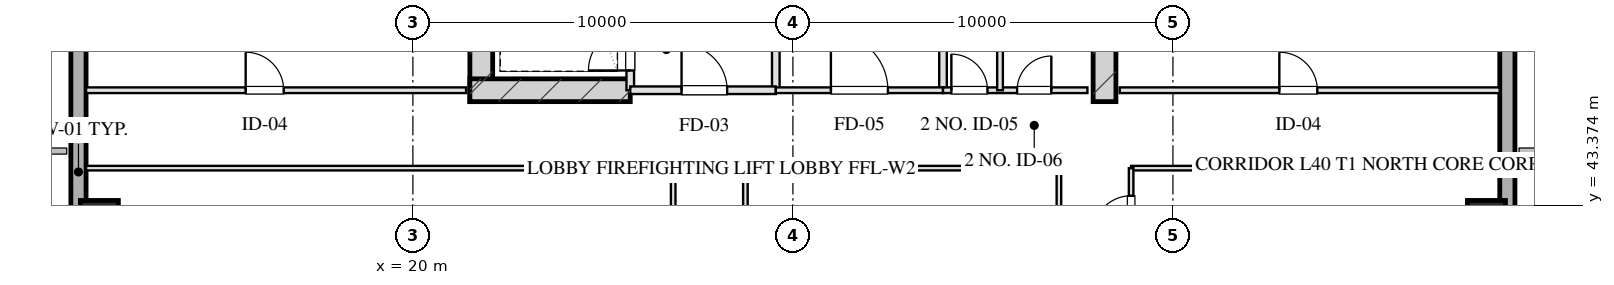
"""IFC4 building model, lengths in metres.
Left out: names, types, materials, properties, quantities, classifications, styles, units other than length and angle.
Written with IfcOpenShell. Run it as: python <this file> out.ifc"""

import sys

from ifc_helpers import new_model, si_unit, direction, frame, frame_2d, origin, origin_2d, place, context, subcontext, project, spatial, rectangle, hollow_rectangle, extrude, element, fill, save


model = new_model("IFC4")
c1 = context("Model", 3, precision=1e-05, world=origin(), true_north=direction((0.0, 1.0)))
c2 = subcontext(c1, "Body", "Model", "MODEL_VIEW")
j1 = project(units=[si_unit("LENGTHUNIT", "METRE"), si_unit("PLANEANGLEUNIT", "RADIAN")], contexts=[c1])
p1 = place(None, origin())
s1 = spatial("IfcSite", under=j1, at=p1, CompositionType="ELEMENT")
p2 = place(p1, origin())
s2 = spatial("IfcBuilding", under=s1, at=p2, CompositionType="ELEMENT")
p3 = place(p2, frame((0.0, 0.0, 152.95)))
s3 = spatial("IfcBuildingStorey", under=s2, at=p3, CompositionType="ELEMENT", Elevation=152.95)
for number, where, z_axis, x_axis in (
    (1, (21.8, 46.1, 0.0), (0.0, 0.0, 1.0), (0.0, 1.0, 0.0)),
    (2, (38.2, 46.1, 0.0), (0.0, 0.0, 1.0), (0.0, 1.0, 0.0)),
):
    element("IfcWall", number, at=place(p3, frame(where, z_axis=z_axis, x_axis=x_axis)), inside=s3, PredefinedType="SHEAR", context=c2, shape_type="SweptSolid", body=[
        extrude(rectangle(XDim=9.48, YDim=0.6, at=frame_2d((4.74, 0.0))), origin(), (0.0, 0.0, 1.0), 3.45),
    ])
p4 = place(p3, frame((21.5, 46.4, 0.0), z_axis=(0.0, 0.0, 1.0), x_axis=(1.0, 0.0, 0.0)))
e3 = element("IfcWall", 3, at=p4, inside=s3, PredefinedType="SHEAR", context=c2, shape_type="SweptSolid", body=[
    extrude(rectangle(XDim=4.22, YDim=0.6, at=frame_2d((2.11, 0.0))), origin(), (0.0, 0.0, 1.0), 3.45),
])
for number, where, z_axis, x_axis in (
    (4, (11.75, 43.0, 0.0), (0.0, 0.0, 1.0), (1.0, 0.0, 0.0)),
    (5, (48.25, 43.0, 0.0), (0.0, 0.0, 1.0), (1.0, 0.0, 0.0)),
):
    element("IfcColumn", number, at=place(p3, frame(where, z_axis=z_axis, x_axis=x_axis)), inside=s3, PredefinedType="COLUMN", context=c2, shape_type="SweptSolid", body=[
        extrude(hollow_rectangle(XDim=1.0, YDim=1.0, WallThickness=0.036, at=origin_2d()), origin(), (0.0, 0.0, 1.0), 3.451),
    ])
p5 = place(p3, frame((11.2, 9.0, 0.0), z_axis=(0.0, 0.0, 1.0), x_axis=(0.0, 1.0, 0.0)))
e6 = element("IfcWall", 6, at=p5, inside=s3, PredefinedType="SOLIDWALL", context=c2, shape_type="SweptSolid", body=[
    extrude(rectangle(XDim=50.0, YDim=0.4, at=frame_2d((25.0, 0.0))), origin(), (0.0, 0.0, 1.0), 2.61),
])
p6 = place(p5, frame((30.275, 0.0, 0.75)))
e7 = element("IfcOpeningElement", 7, at=p6, cuts=e6, PredefinedType="OPENING", context=c2, shape_type="SweptSolid", body=[
    extrude(rectangle(XDim=2.25, YDim=1.46, at=frame_2d((1.125, 0.73))), frame((0.0, 0.21, 0.0), z_axis=(0.0, -1.0, 0.0), x_axis=(1.0, 0.0, 0.0)), (0.0, 0.0, 1.0), 0.42),
])
p7 = place(p5, frame((18.65, 0.0, 0.0)))
e8 = element("IfcOpeningElement", 8, at=p7, cuts=e6, PredefinedType="OPENING", context=c2, shape_type="SweptSolid", body=[
    extrude(rectangle(XDim=1.1, YDim=2.15, at=frame_2d((0.55, 1.075))), frame((0.0, 0.21, 0.0), z_axis=(0.0, -1.0, 0.0), x_axis=(1.0, 0.0, 0.0)), (0.0, 0.0, 1.0), 0.42),
])
p8 = place(p3, frame((48.8, 59.0, 0.0), z_axis=(0.0, 0.0, 1.0), x_axis=(0.0, -1.0, 0.0)))
e9 = element("IfcWall", 9, at=p8, inside=s3, PredefinedType="SOLIDWALL", context=c2, shape_type="SweptSolid", body=[
    extrude(rectangle(XDim=50.0, YDim=0.4, at=frame_2d((25.0, 0.0))), origin(), (0.0, 0.0, 1.0), 2.61),
])
p9 = place(p8, frame((30.25, 0.0, 0.0)))
e10 = element("IfcOpeningElement", 10, at=p9, cuts=e9, PredefinedType="OPENING", context=c2, shape_type="SweptSolid", body=[
    extrude(rectangle(XDim=1.1, YDim=2.15, at=frame_2d((0.55, 1.075))), frame((0.0, 0.21, 0.0), z_axis=(0.0, -1.0, 0.0), x_axis=(1.0, 0.0, 0.0)), (0.0, 0.0, 1.0), 0.42),
])
p10 = place(p3, frame((25.72, 46.4, 0.0), z_axis=(0.0, 0.0, 1.0), x_axis=(0.0, 1.0, 0.0)))
e11 = element("IfcWall", 11, at=p10, inside=s3, PredefinedType="PARTITIONING", context=c2, shape_type="SweptSolid", body=[
    extrude(rectangle(XDim=1.9, YDim=0.2, at=frame_2d((0.95, 0.0))), origin(), (0.0, 0.0, 1.0), 3.175),
])
p11 = place(p10, frame((0.52, 0.0, 0.0)))
e12 = element("IfcOpeningElement", 12, at=p11, cuts=e11, PredefinedType="OPENING", context=c2, shape_type="SweptSolid", body=[
    extrude(rectangle(XDim=1.1, YDim=2.05, at=frame_2d((0.55, 1.025))), frame((0.0, 0.11, 0.0), z_axis=(0.0, -1.0, 0.0), x_axis=(1.0, 0.0, 0.0)), (0.0, 0.0, 1.0), 0.22),
])
p12 = place(p3, frame((29.55, 46.4, 0.0), z_axis=(0.0, 0.0, 1.0), x_axis=(0.0, 1.0, 0.0)))
e13 = element("IfcWall", 13, at=p12, inside=s3, PredefinedType="PARTITIONING", context=c2, shape_type="SweptSolid", body=[
    extrude(rectangle(XDim=8.43, YDim=0.2, at=frame_2d((4.215, 0.0))), origin(), (0.0, 0.0, 1.0), 3.175),
])
p13 = place(p3, frame((25.72, 46.4, 0.0), z_axis=(0.0, 0.0, 1.0), x_axis=(1.0, 0.0, 0.0)))
e14 = element("IfcWall", 14, at=p13, inside=s3, PredefinedType="PARTITIONING", context=c2, shape_type="SweptSolid", body=[
    extrude(rectangle(XDim=3.83, YDim=0.2, at=frame_2d((1.915, 0.0))), origin(), (0.0, 0.0, 1.0), 3.175),
])
p14 = place(p13, frame((1.35, 0.0, 0.0)))
e15 = element("IfcOpeningElement", 15, at=p14, cuts=e14, PredefinedType="OPENING", context=c2, shape_type="SweptSolid", body=[
    extrude(rectangle(XDim=1.2, YDim=2.05, at=frame_2d((0.6, 1.025))), frame((0.0, 0.11, 0.0), z_axis=(0.0, -1.0, 0.0), x_axis=(1.0, 0.0, 0.0)), (0.0, 0.0, 1.0), 0.22),
])
p15 = place(p3, frame((33.95, 46.4, 0.0), z_axis=(0.0, 0.0, 1.0), x_axis=(0.0, 1.0, 0.0)))
e16 = element("IfcWall", 16, at=p15, inside=s3, PredefinedType="PARTITIONING", context=c2, shape_type="SweptSolid", body=[
    extrude(rectangle(XDim=8.43, YDim=0.2, at=frame_2d((4.215, 0.0))), origin(), (0.0, 0.0, 1.0), 3.175),
])
p16 = place(p3, frame((29.55, 46.4, 0.0), z_axis=(0.0, 0.0, 1.0), x_axis=(1.0, 0.0, 0.0)))
e17 = element("IfcWall", 17, at=p16, inside=s3, PredefinedType="PARTITIONING", context=c2, shape_type="SweptSolid", body=[
    extrude(rectangle(XDim=4.4, YDim=0.15, at=frame_2d((2.2, 0.0))), origin(), (0.0, 0.0, 1.0), 3.175),
])
p17 = place(p16, frame((1.45, 0.0, 0.0)))
e18 = element("IfcOpeningElement", 18, at=p17, cuts=e17, PredefinedType="OPENING", context=c2, shape_type="SweptSolid", body=[
    extrude(rectangle(XDim=1.5, YDim=2.05, at=frame_2d((0.75, 1.025))), frame((0.0, 0.085, 0.0), z_axis=(0.0, -1.0, 0.0), x_axis=(1.0, 0.0, 0.0)), (0.0, 0.0, 1.0), 0.17),
])
p18 = place(p3, frame((33.95, 46.4, 0.0), z_axis=(0.0, 0.0, 1.0), x_axis=(1.0, 0.0, 0.0)))
e19 = element("IfcWall", 19, at=p18, inside=s3, PredefinedType="PARTITIONING", context=c2, shape_type="SweptSolid", body=[
    extrude(rectangle(XDim=3.8, YDim=0.15, at=frame_2d((1.9, 0.0))), origin(), (0.0, 0.0, 1.0), 3.175),
])
p19 = place(p18, frame((0.22, 0.0, 0.0)))
e20 = element("IfcOpeningElement", 20, at=p19, cuts=e19, PredefinedType="OPENING", context=c2, shape_type="SweptSolid", body=[
    extrude(rectangle(XDim=0.95, YDim=2.05, at=frame_2d((0.475, 1.025))), frame((0.0, 0.085, 0.0), z_axis=(0.0, -1.0, 0.0), x_axis=(1.0, 0.0, 0.0)), (0.0, 0.0, 1.0), 0.17),
])
p20 = place(p18, frame((1.95, 0.0, 0.0)))
e21 = element("IfcOpeningElement", 21, at=p20, cuts=e19, PredefinedType="OPENING", context=c2, shape_type="SweptSolid", body=[
    extrude(rectangle(XDim=0.9, YDim=2.05, at=frame_2d((0.45, 1.025))), frame((0.0, 0.085, 0.0), z_axis=(0.0, -1.0, 0.0), x_axis=(1.0, 0.0, 0.0)), (0.0, 0.0, 1.0), 0.17),
])
p21 = place(p3, frame((35.45, 46.4, 0.0), z_axis=(0.0, 0.0, 1.0), x_axis=(0.0, 1.0, 0.0)))
e22 = element("IfcWall", 22, at=p21, inside=s3, PredefinedType="PARTITIONING", context=c2, shape_type="SweptSolid", body=[
    extrude(rectangle(XDim=8.43, YDim=0.15, at=frame_2d((4.215, 0.0))), origin(), (0.0, 0.0, 1.0), 2.765),
])
p22 = place(p21, frame((2.55, 0.0, 0.0)))
e23 = element("IfcOpeningElement", 23, at=p22, cuts=e22, PredefinedType="OPENING", context=c2, shape_type="SweptSolid", body=[
    extrude(rectangle(XDim=0.95, YDim=2.05, at=frame_2d((0.475, 1.025))), frame((0.0, 0.085, 0.0), z_axis=(0.0, -1.0, 0.0), x_axis=(1.0, 0.0, 0.0)), (0.0, 0.0, 1.0), 0.17),
])
p23 = place(p21, frame((5.6, 0.0, 0.0)))
e24 = element("IfcOpeningElement", 24, at=p23, cuts=e22, PredefinedType="OPENING", context=c2, shape_type="SweptSolid", body=[
    extrude(rectangle(XDim=0.9, YDim=2.05, at=frame_2d((0.45, 1.025))), frame((0.0, 0.085, 0.0), z_axis=(0.0, -1.0, 0.0), x_axis=(1.0, 0.0, 0.0)), (0.0, 0.0, 1.0), 0.17),
])
p24 = place(p3, frame((11.4, 46.4, 0.0), z_axis=(0.0, 0.0, 1.0), x_axis=(1.0, 0.0, 0.0)))
e25 = element("IfcWall", 25, at=p24, inside=s3, PredefinedType="PARTITIONING", context=c2, shape_type="SweptSolid", body=[
    extrude(rectangle(XDim=10.0, YDim=0.15, at=frame_2d((5.0, 0.0))), origin(), (0.0, 0.0, 1.0), 3.175),
])
p25 = place(p24, frame((4.2, 0.0, 0.0)))
e26 = element("IfcOpeningElement", 26, at=p25, cuts=e25, PredefinedType="OPENING", context=c2, shape_type="SweptSolid", body=[
    extrude(rectangle(XDim=1.0, YDim=2.05, at=frame_2d((0.5, 1.025))), frame((0.0, 0.085, 0.0), z_axis=(0.0, -1.0, 0.0), x_axis=(1.0, 0.0, 0.0)), (0.0, 0.0, 1.0), 0.17),
])
p26 = place(p3, frame((38.6, 46.4, 0.0), z_axis=(0.0, 0.0, 1.0), x_axis=(1.0, 0.0, 0.0)))
e27 = element("IfcWall", 27, at=p26, inside=s3, PredefinedType="PARTITIONING", context=c2, shape_type="SweptSolid", body=[
    extrude(rectangle(XDim=10.0, YDim=0.15, at=frame_2d((5.0, 0.0))), origin(), (0.0, 0.0, 1.0), 3.175),
])
p27 = place(p26, frame((4.2, 0.0, 0.0)))
e28 = element("IfcOpeningElement", 28, at=p27, cuts=e27, PredefinedType="OPENING", context=c2, shape_type="SweptSolid", body=[
    extrude(rectangle(XDim=1.0, YDim=2.05, at=frame_2d((0.5, 1.025))), frame((0.0, 0.085, 0.0), z_axis=(0.0, -1.0, 0.0), x_axis=(1.0, 0.0, 0.0)), (0.0, 0.0, 1.0), 0.17),
])
p28 = place(p3, frame((11.4, 44.35, 0.0), z_axis=(0.0, 0.0, 1.0), x_axis=(1.0, 0.0, 0.0)))
e29 = element("IfcWall", 29, at=p28, inside=s3, PredefinedType="PARTITIONING", context=c2, shape_type="SweptSolid", body=[
    extrude(rectangle(XDim=15.45, YDim=0.12, at=frame_2d((7.725, 0.0))), origin(), (0.0, 0.0, 1.0), 3.175),
])
p29 = place(p3, frame((28.75, 44.35, 0.0), z_axis=(0.0, 0.0, 1.0), x_axis=(1.0, 0.0, 0.0)))
e30 = element("IfcWall", 30, at=p29, inside=s3, PredefinedType="PARTITIONING", context=c2, shape_type="SweptSolid", body=[
    extrude(rectangle(XDim=8.25, YDim=0.12, at=frame_2d((4.125, 0.0))), origin(), (0.0, 0.0, 1.0), 3.175),
])
p30 = place(p3, frame((38.9, 44.35, 0.0), z_axis=(0.0, 0.0, 1.0), x_axis=(1.0, 0.0, 0.0)))
e31 = element("IfcWall", 31, at=p30, inside=s3, PredefinedType="PARTITIONING", context=c2, shape_type="SweptSolid", body=[
    extrude(rectangle(XDim=9.7, YDim=0.12, at=frame_2d((4.85, 0.0))), origin(), (0.0, 0.0, 1.0), 3.175),
])
p31 = place(p3, frame((26.85, 23.65, 0.0), z_axis=(0.0, 0.0, 1.0), x_axis=(0.0, 1.0, 0.0)))
e32 = element("IfcWall", 32, at=p31, inside=s3, PredefinedType="PARTITIONING", context=c2, shape_type="SweptSolid", body=[
    extrude(rectangle(XDim=20.7, YDim=0.12, at=frame_2d((10.35, 0.0))), origin(), (0.0, 0.0, 1.0), 3.175),
])
p32 = place(p31, frame((2.675, 0.0, 0.0)))
e33 = element("IfcOpeningElement", 33, at=p32, cuts=e32, PredefinedType="OPENING", context=c2, shape_type="SweptSolid", body=[
    extrude(rectangle(XDim=1.0, YDim=2.05, at=frame_2d((0.5, 1.025))), frame((0.0, 0.07, 0.0), z_axis=(0.0, -1.0, 0.0), x_axis=(1.0, 0.0, 0.0)), (0.0, 0.0, 1.0), 0.14),
])
p33 = place(p31, frame((9.85, 0.0, 0.0)))
e34 = element("IfcOpeningElement", 34, at=p33, cuts=e32, PredefinedType="OPENING", context=c2, shape_type="SweptSolid", body=[
    extrude(rectangle(XDim=1.05, YDim=2.05, at=frame_2d((0.525, 1.025))), frame((0.0, 0.07, 0.0), z_axis=(0.0, -1.0, 0.0), x_axis=(1.0, 0.0, 0.0)), (0.0, 0.0, 1.0), 0.14),
])
p34 = place(p31, frame((17.025, 0.0, 0.0)))
e35 = element("IfcOpeningElement", 35, at=p34, cuts=e32, PredefinedType="OPENING", context=c2, shape_type="SweptSolid", body=[
    extrude(rectangle(XDim=1.0, YDim=2.05, at=frame_2d((0.5, 1.025))), frame((0.0, 0.07, 0.0), z_axis=(0.0, -1.0, 0.0), x_axis=(1.0, 0.0, 0.0)), (0.0, 0.0, 1.0), 0.14),
])
p35 = place(p3, frame((28.75, 23.65, 0.0), z_axis=(0.0, 0.0, 1.0), x_axis=(0.0, 1.0, 0.0)))
e36 = element("IfcWall", 36, at=p35, inside=s3, PredefinedType="PARTITIONING", context=c2, shape_type="SweptSolid", body=[
    extrude(rectangle(XDim=20.7, YDim=0.12, at=frame_2d((10.35, 0.0))), origin(), (0.0, 0.0, 1.0), 3.175),
])
p36 = place(p35, frame((9.936, 0.0, 0.0)))
e37 = element("IfcOpeningElement", 37, at=p36, cuts=e36, PredefinedType="OPENING", context=c2, shape_type="SweptSolid", body=[
    extrude(rectangle(XDim=1.1, YDim=2.05, at=frame_2d((0.55, 1.025))), frame((0.0, 0.07, 0.0), z_axis=(0.0, -1.0, 0.0), x_axis=(1.0, 0.0, 0.0)), (0.0, 0.0, 1.0), 0.14),
])
p37 = place(p3, frame((37.0, 23.65, 0.0), z_axis=(0.0, 0.0, 1.0), x_axis=(0.0, 1.0, 0.0)))
e38 = element("IfcWall", 38, at=p37, inside=s3, PredefinedType="PARTITIONING", context=c2, shape_type="SweptSolid", body=[
    extrude(rectangle(XDim=20.7, YDim=0.12, at=frame_2d((10.35, 0.0))), origin(), (0.0, 0.0, 1.0), 3.175),
])
p38 = place(p3, frame((38.9, 23.65, 0.0), z_axis=(0.0, 0.0, 1.0), x_axis=(0.0, 1.0, 0.0)))
e39 = element("IfcWall", 39, at=p38, inside=s3, PredefinedType="PARTITIONING", context=c2, shape_type="SweptSolid", body=[
    extrude(rectangle(XDim=20.7, YDim=0.12, at=frame_2d((10.35, 0.0))), origin(), (0.0, 0.0, 1.0), 3.175),
])
p39 = place(p38, frame((0.775, 0.0, 0.0)))
e40 = element("IfcOpeningElement", 40, at=p39, cuts=e39, PredefinedType="OPENING", context=c2, shape_type="SweptSolid", body=[
    extrude(rectangle(XDim=1.0, YDim=2.05, at=frame_2d((0.5, 1.025))), frame((0.0, 0.07, 0.0), z_axis=(0.0, -1.0, 0.0), x_axis=(1.0, 0.0, 0.0)), (0.0, 0.0, 1.0), 0.14),
])
p40 = place(p38, frame((3.95, 0.0, 0.0)))
e41 = element("IfcOpeningElement", 41, at=p40, cuts=e39, PredefinedType="OPENING", context=c2, shape_type="SweptSolid", body=[
    extrude(rectangle(XDim=1.0, YDim=2.05, at=frame_2d((0.5, 1.025))), frame((0.0, 0.07, 0.0), z_axis=(0.0, -1.0, 0.0), x_axis=(1.0, 0.0, 0.0)), (0.0, 0.0, 1.0), 0.14),
])
p41 = place(p38, frame((8.45, 0.0, 0.0)))
e42 = element("IfcOpeningElement", 42, at=p41, cuts=e39, PredefinedType="OPENING", context=c2, shape_type="SweptSolid", body=[
    extrude(rectangle(XDim=1.0, YDim=2.05, at=frame_2d((0.5, 1.025))), frame((0.0, 0.07, 0.0), z_axis=(0.0, -1.0, 0.0), x_axis=(1.0, 0.0, 0.0)), (0.0, 0.0, 1.0), 0.14),
])
p42 = place(p38, frame((12.95, 0.0, 0.0)))
e43 = element("IfcOpeningElement", 43, at=p42, cuts=e39, PredefinedType="OPENING", context=c2, shape_type="SweptSolid", body=[
    extrude(rectangle(XDim=1.0, YDim=2.05, at=frame_2d((0.5, 1.025))), frame((0.0, 0.07, 0.0), z_axis=(0.0, -1.0, 0.0), x_axis=(1.0, 0.0, 0.0)), (0.0, 0.0, 1.0), 0.14),
])
p43 = place(p38, frame((16.299, 0.0, 0.0)))
e44 = element("IfcOpeningElement", 44, at=p43, cuts=e39, PredefinedType="OPENING", context=c2, shape_type="SweptSolid", body=[
    extrude(rectangle(XDim=1.05, YDim=2.05, at=frame_2d((0.525, 1.025))), frame((0.0, 0.07, 0.0), z_axis=(0.0, -1.0, 0.0), x_axis=(1.0, 0.0, 0.0)), (0.0, 0.0, 1.0), 0.14),
])
p44 = place(p38, frame((18.974, 0.0, 0.0)))
e45 = element("IfcOpeningElement", 45, at=p44, cuts=e39, PredefinedType="OPENING", context=c2, shape_type="SweptSolid", body=[
    extrude(rectangle(XDim=1.0, YDim=2.05, at=frame_2d((0.5, 1.025))), frame((0.0, 0.07, 0.0), z_axis=(0.0, -1.0, 0.0), x_axis=(1.0, 0.0, 0.0)), (0.0, 0.0, 1.0), 0.14),
])
p45 = place(p11, origin())
e46 = element("IfcDoor", 46, at=p45, inside=s3, OperationType="SINGLE_SWING_LEFT", PredefinedType="DOOR", context=c2, shape_type="SweptSolid", body=[
    extrude(rectangle(XDim=1.1, YDim=2.05, at=frame_2d((0.55, 1.025))), frame((0.0, 0.025, 0.0), z_axis=(0.0, -1.0, 0.0), x_axis=(1.0, 0.0, 0.0)), (0.0, 0.0, 1.0), 0.05),
])
fill(e12, e46)
p46 = place(p14, origin())
e47 = element("IfcDoor", 47, at=p46, inside=s3, OperationType="SINGLE_SWING_LEFT", PredefinedType="DOOR", context=c2, shape_type="SweptSolid", body=[
    extrude(rectangle(XDim=1.2, YDim=2.05, at=frame_2d((0.6, 1.025))), frame((0.0, 0.025, 0.0), z_axis=(0.0, -1.0, 0.0), x_axis=(1.0, 0.0, 0.0)), (0.0, 0.0, 1.0), 0.05),
])
fill(e15, e47)
p47 = place(p17, origin())
e48 = element("IfcDoor", 48, at=p47, inside=s3, OperationType="SINGLE_SWING_LEFT", PredefinedType="DOOR", context=c2, shape_type="SweptSolid", body=[
    extrude(rectangle(XDim=1.5, YDim=2.05, at=frame_2d((0.75, 1.025))), frame((0.0, 0.025, 0.0), z_axis=(0.0, -1.0, 0.0), x_axis=(1.0, 0.0, 0.0)), (0.0, 0.0, 1.0), 0.05),
])
fill(e18, e48)
p48 = place(p19, origin())
e49 = element("IfcDoor", 49, at=p48, inside=s3, OperationType="SINGLE_SWING_LEFT", PredefinedType="DOOR", context=c2, shape_type="SweptSolid", body=[
    extrude(rectangle(XDim=0.95, YDim=2.05, at=frame_2d((0.475, 1.025))), frame((0.0, 0.025, 0.0), z_axis=(0.0, -1.0, 0.0), x_axis=(1.0, 0.0, 0.0)), (0.0, 0.0, 1.0), 0.05),
])
fill(e20, e49)
p49 = place(p20, origin())
e50 = element("IfcDoor", 50, at=p49, inside=s3, OperationType="SINGLE_SWING_RIGHT", PredefinedType="DOOR", context=c2, shape_type="SweptSolid", body=[
    extrude(rectangle(XDim=0.9, YDim=2.05, at=frame_2d((0.45, 1.025))), frame((0.0, 0.025, 0.0), z_axis=(0.0, -1.0, 0.0), x_axis=(1.0, 0.0, 0.0)), (0.0, 0.0, 1.0), 0.05),
])
fill(e21, e50)
p50 = place(p25, origin())
e51 = element("IfcDoor", 51, at=p50, inside=s3, OperationType="SINGLE_SWING_LEFT", PredefinedType="DOOR", context=c2, shape_type="SweptSolid", body=[
    extrude(rectangle(XDim=1.0, YDim=2.05, at=frame_2d((0.5, 1.025))), frame((0.0, 0.025, 0.0), z_axis=(0.0, -1.0, 0.0), x_axis=(1.0, 0.0, 0.0)), (0.0, 0.0, 1.0), 0.05),
])
fill(e26, e51)
p51 = place(p27, origin())
e52 = element("IfcDoor", 52, at=p51, inside=s3, OperationType="SINGLE_SWING_LEFT", PredefinedType="DOOR", context=c2, shape_type="SweptSolid", body=[
    extrude(rectangle(XDim=1.0, YDim=2.05, at=frame_2d((0.5, 1.025))), frame((0.0, 0.025, 0.0), z_axis=(0.0, -1.0, 0.0), x_axis=(1.0, 0.0, 0.0)), (0.0, 0.0, 1.0), 0.05),
])
fill(e28, e52)
p52 = place(p44, origin())
e53 = element("IfcDoor", 53, at=p52, inside=s3, OperationType="SINGLE_SWING_LEFT", PredefinedType="DOOR", context=c2, shape_type="SweptSolid", body=[
    extrude(rectangle(XDim=1.0, YDim=2.05, at=frame_2d((0.5, 1.025))), frame((0.0, 0.025, 0.0), z_axis=(0.0, -1.0, 0.0), x_axis=(1.0, 0.0, 0.0)), (0.0, 0.0, 1.0), 0.05),
])
fill(e45, e53)
save(model, sys.argv[1])
